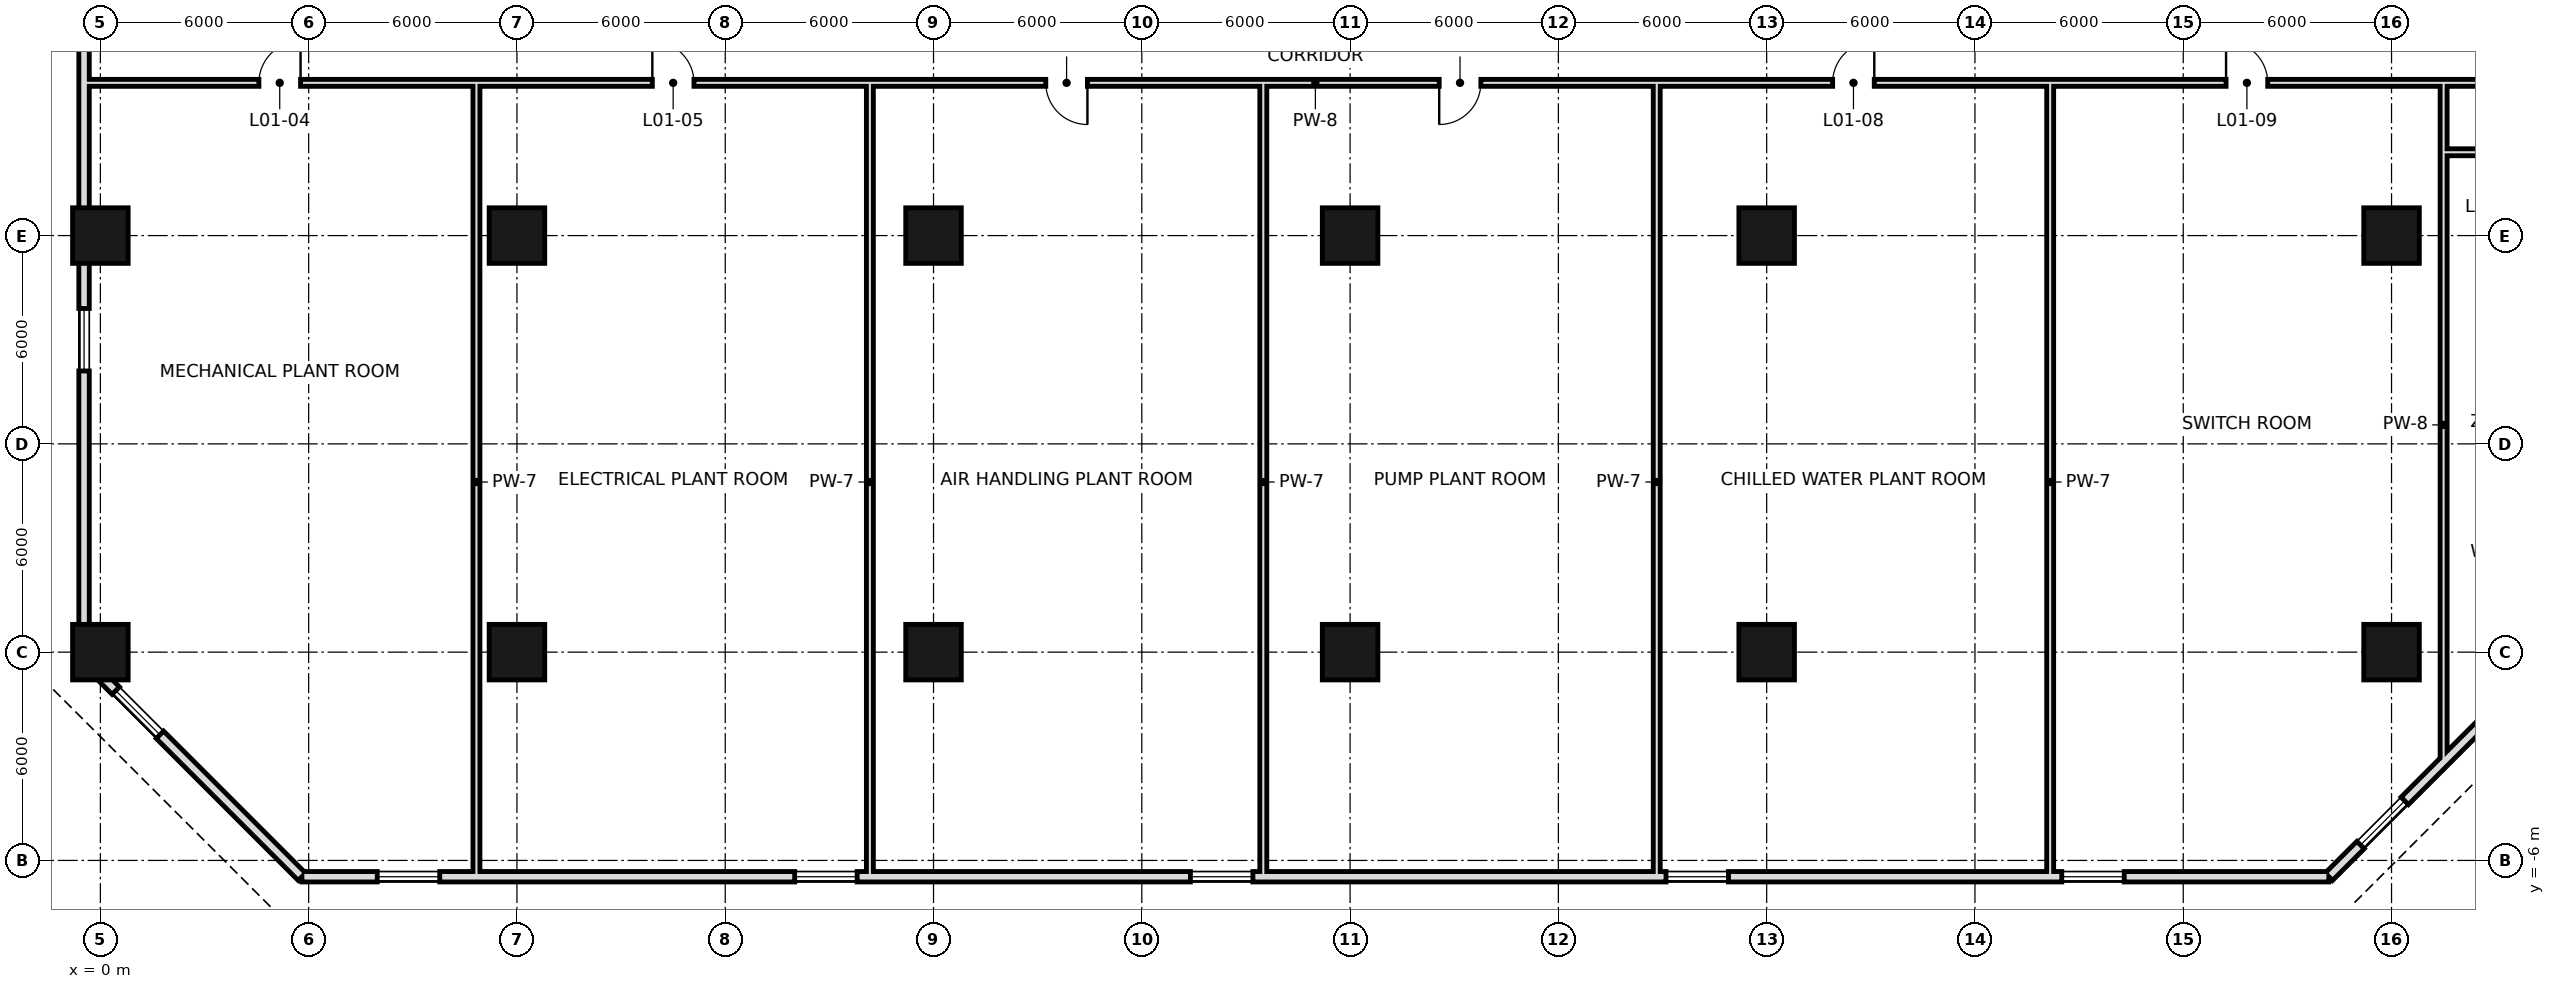
"""IFC4 building model, lengths in metres.
Left out: names, types, materials, properties, quantities, classifications, styles, units other than length and angle.
Written with IfcOpenShell. Run it as: python <this file> out.ifc"""

import sys

from ifc_helpers import new_model, si_unit, direction, frame, frame_2d, origin, origin_2d, place, context, subcontext, project, spatial, rectangle, hollow_rectangle, extrude, element, fill, save


model = new_model("IFC4")
c1 = context("Model", 3, precision=1e-05, world=origin(), true_north=direction((0.0, 1.0)))
c2 = subcontext(c1, "Body", "Model", "MODEL_VIEW")
j1 = project(units=[si_unit("LENGTHUNIT", "METRE"), si_unit("PLANEANGLEUNIT", "RADIAN")], contexts=[c1])
p1 = place(None, origin())
s1 = spatial("IfcSite", under=j1, at=p1, CompositionType="ELEMENT")
p2 = place(p1, origin())
s2 = spatial("IfcBuilding", under=s1, at=p2, CompositionType="ELEMENT")
p3 = place(p2, frame((0.0, 0.0, 15.0)))
s3 = spatial("IfcBuildingStorey", under=s2, at=p3, CompositionType="ELEMENT", Elevation=15.0)
for number, where, z_axis, x_axis in (
    (1, (0.0, 0.0, 0.0), (0.0, 0.0, 1.0), (1.0, 0.0, 0.0)),
    (2, (0.0, 12.0, 0.0), (0.0, 0.0, 1.0), (1.0, 0.0, 0.0)),
    (3, (12.0, 0.0, 0.0), (0.0, 0.0, 1.0), (1.0, 0.0, 0.0)),
    (4, (12.0, 12.0, 0.0), (0.0, 0.0, 1.0), (1.0, 0.0, 0.0)),
    (5, (24.0, 0.0, 0.0), (0.0, 0.0, 1.0), (1.0, 0.0, 0.0)),
    (6, (24.0, 12.0, 0.0), (0.0, 0.0, 1.0), (1.0, 0.0, 0.0)),
    (7, (36.0, 0.0, 0.0), (0.0, 0.0, 1.0), (1.0, 0.0, 0.0)),
    (8, (36.0, 12.0, 0.0), (0.0, 0.0, 1.0), (1.0, 0.0, 0.0)),
    (9, (48.0, 0.0, 0.0), (0.0, 0.0, 1.0), (1.0, 0.0, 0.0)),
    (10, (48.0, 12.0, 0.0), (0.0, 0.0, 1.0), (1.0, 0.0, 0.0)),
    (11, (66.0, 0.0, 0.0), (0.0, 0.0, 1.0), (1.0, 0.0, 0.0)),
    (12, (66.0, 12.0, 0.0), (0.0, 0.0, 1.0), (1.0, 0.0, 0.0)),
):
    element("IfcColumn", number, at=place(p3, frame(where, z_axis=z_axis, x_axis=x_axis)), inside=s3, PredefinedType="COLUMN", context=c2, shape_type="SweptSolid", body=[
        extrude(hollow_rectangle(XDim=1.6, YDim=1.6, WallThickness=0.07, at=origin_2d()), origin(), (0.0, 0.0, 1.0), 5.4),
    ])
p4 = place(p3, frame((5.805, -6.47, 0.0), z_axis=(0.0, 0.0, 1.0), x_axis=(1.0, 0.0, 0.0)))
e13 = element("IfcWall", 13, at=p4, inside=s3, PredefinedType="SOLIDWALL", context=c2, shape_type="SweptSolid", body=[
    extrude(rectangle(XDim=58.389, YDim=0.3, at=frame_2d((29.195, 0.0))), origin(), (0.0, 0.0, 1.0), 5.0),
])
p5 = place(p4, frame((2.17, 0.0, 0.9)))
e14 = element("IfcOpeningElement", 14, at=p5, cuts=e13, PredefinedType="OPENING", context=c2, shape_type="SweptSolid", body=[
    extrude(rectangle(XDim=1.8, YDim=1.5, at=frame_2d((0.9, 0.75))), frame((0.0, 0.16, 0.0), z_axis=(0.0, -1.0, 0.0), x_axis=(1.0, 0.0, 0.0)), (0.0, 0.0, 1.0), 0.32),
])
p6 = place(p4, frame((14.195, 0.0, 0.9)))
e15 = element("IfcOpeningElement", 15, at=p6, cuts=e13, PredefinedType="OPENING", context=c2, shape_type="SweptSolid", body=[
    extrude(rectangle(XDim=1.8, YDim=1.5, at=frame_2d((0.9, 0.75))), frame((0.0, 0.16, 0.0), z_axis=(0.0, -1.0, 0.0), x_axis=(1.0, 0.0, 0.0)), (0.0, 0.0, 1.0), 0.32),
])
p7 = place(p4, frame((25.595, 0.0, 0.9)))
e16 = element("IfcOpeningElement", 16, at=p7, cuts=e13, PredefinedType="OPENING", context=c2, shape_type="SweptSolid", body=[
    extrude(rectangle(XDim=1.8, YDim=1.5, at=frame_2d((0.9, 0.75))), frame((0.0, 0.16, 0.0), z_axis=(0.0, -1.0, 0.0), x_axis=(1.0, 0.0, 0.0)), (0.0, 0.0, 1.0), 0.32),
])
p8 = place(p4, frame((39.295, 0.0, 0.9)))
e17 = element("IfcOpeningElement", 17, at=p8, cuts=e13, PredefinedType="OPENING", context=c2, shape_type="SweptSolid", body=[
    extrude(rectangle(XDim=1.8, YDim=1.5, at=frame_2d((0.9, 0.75))), frame((0.0, 0.16, 0.0), z_axis=(0.0, -1.0, 0.0), x_axis=(1.0, 0.0, 0.0)), (0.0, 0.0, 1.0), 0.32),
])
p9 = place(p4, frame((50.695, 0.0, 0.9)))
e18 = element("IfcOpeningElement", 18, at=p9, cuts=e13, PredefinedType="OPENING", context=c2, shape_type="SweptSolid", body=[
    extrude(rectangle(XDim=1.8, YDim=1.5, at=frame_2d((0.9, 0.75))), frame((0.0, 0.16, 0.0), z_axis=(0.0, -1.0, 0.0), x_axis=(1.0, 0.0, 0.0)), (0.0, 0.0, 1.0), 0.32),
])
p10 = place(p3, frame((64.195, -6.47, 0.0), z_axis=(0.0, 0.0, 1.0), x_axis=(0.707106781187, 0.707106781187, 0.0)))
e19 = element("IfcWall", 19, at=p10, inside=s3, PredefinedType="SOLIDWALL", context=c2, shape_type="SweptSolid", body=[
    extrude(rectangle(XDim=8.875, YDim=0.3, at=frame_2d((4.438, 0.0))), origin(), (0.0, 0.0, 1.0), 5.0),
])
p11 = place(p10, frame((1.292, 0.0, 0.9)))
e20 = element("IfcOpeningElement", 20, at=p11, cuts=e19, PredefinedType="OPENING", context=c2, shape_type="SweptSolid", body=[
    extrude(rectangle(XDim=1.8, YDim=1.5, at=frame_2d((0.9, 0.75))), frame((0.0, 0.16, 0.0), z_axis=(0.0, -1.0, 0.0), x_axis=(1.0, 0.0, 0.0)), (0.0, 0.0, 1.0), 0.32),
])
p12 = place(p3, frame((-0.47, 46.195, 0.0), z_axis=(0.0, 0.0, 1.0), x_axis=(0.0, -1.0, 0.0)))
e21 = element("IfcWall", 21, at=p12, inside=s3, PredefinedType="SOLIDWALL", context=c2, shape_type="SweptSolid", body=[
    extrude(rectangle(XDim=46.389, YDim=0.3, at=frame_2d((23.195, 0.0))), origin(), (0.0, 0.0, 1.0), 5.0),
])
p13 = place(p12, frame((1.17, 0.0, 0.9)))
e22 = element("IfcOpeningElement", 22, at=p13, cuts=e21, PredefinedType="OPENING", context=c2, shape_type="SweptSolid", body=[
    extrude(rectangle(XDim=1.8, YDim=1.5, at=frame_2d((0.9, 0.75))), frame((0.0, 0.16, 0.0), z_axis=(0.0, -1.0, 0.0), x_axis=(1.0, 0.0, 0.0)), (0.0, 0.0, 1.0), 0.32),
])
p14 = place(p12, frame((12.295, 0.0, 0.9)))
e23 = element("IfcOpeningElement", 23, at=p14, cuts=e21, PredefinedType="OPENING", context=c2, shape_type="SweptSolid", body=[
    extrude(rectangle(XDim=1.8, YDim=1.5, at=frame_2d((0.9, 0.75))), frame((0.0, 0.16, 0.0), z_axis=(0.0, -1.0, 0.0), x_axis=(1.0, 0.0, 0.0)), (0.0, 0.0, 1.0), 0.32),
])
p15 = place(p12, frame((24.295, 0.0, 0.9)))
e24 = element("IfcOpeningElement", 24, at=p15, cuts=e21, PredefinedType="OPENING", context=c2, shape_type="SweptSolid", body=[
    extrude(rectangle(XDim=1.8, YDim=1.5, at=frame_2d((0.9, 0.75))), frame((0.0, 0.16, 0.0), z_axis=(0.0, -1.0, 0.0), x_axis=(1.0, 0.0, 0.0)), (0.0, 0.0, 1.0), 0.32),
])
p16 = place(p12, frame((36.295, 0.0, 0.9)))
e25 = element("IfcOpeningElement", 25, at=p16, cuts=e21, PredefinedType="OPENING", context=c2, shape_type="SweptSolid", body=[
    extrude(rectangle(XDim=1.8, YDim=1.5, at=frame_2d((0.9, 0.75))), frame((0.0, 0.16, 0.0), z_axis=(0.0, -1.0, 0.0), x_axis=(1.0, 0.0, 0.0)), (0.0, 0.0, 1.0), 0.32),
])
p17 = place(p3, frame((-0.47, -0.195, 0.0), z_axis=(0.0, 0.0, 1.0), x_axis=(0.707106781187, -0.707106781187, 0.0)))
e26 = element("IfcWall", 26, at=p17, inside=s3, PredefinedType="SOLIDWALL", context=c2, shape_type="SweptSolid", body=[
    extrude(rectangle(XDim=8.875, YDim=0.3, at=frame_2d((4.438, 0.0))), origin(), (0.0, 0.0, 1.0), 5.0),
])
p18 = place(p17, frame((1.292, 0.0, 0.9)))
e27 = element("IfcOpeningElement", 27, at=p18, cuts=e26, PredefinedType="OPENING", context=c2, shape_type="SweptSolid", body=[
    extrude(rectangle(XDim=1.8, YDim=1.5, at=frame_2d((0.9, 0.75))), frame((0.0, 0.16, 0.0), z_axis=(0.0, -1.0, 0.0), x_axis=(1.0, 0.0, 0.0)), (0.0, 0.0, 1.0), 0.32),
])
for number, where, z_axis, x_axis in (
    (28, (10.833, -6.5, 0.0), (0.0, 0.0, 1.0), (0.0, 1.0, 0.0)),
    (29, (22.167, -6.5, 0.0), (0.0, 0.0, 1.0), (0.0, 1.0, 0.0)),
    (30, (33.5, -6.5, 0.0), (0.0, 0.0, 1.0), (0.0, 1.0, 0.0)),
    (31, (44.833, -6.5, 0.0), (0.0, 0.0, 1.0), (0.0, 1.0, 0.0)),
    (32, (56.167, -6.5, 0.0), (0.0, 0.0, 1.0), (0.0, 1.0, 0.0)),
):
    element("IfcWall", number, at=place(p3, frame(where, z_axis=z_axis, x_axis=x_axis)), inside=s3, PredefinedType="SOLIDWALL", context=c2, shape_type="SweptSolid", body=[
        extrude(rectangle(XDim=22.8, YDim=0.2, at=frame_2d((11.4, 0.0))), origin(), (0.0, 0.0, 1.0), 3.2),
    ])
p19 = place(p3, frame((67.5, -3.207, 0.0), z_axis=(0.0, 0.0, 1.0), x_axis=(0.0, 1.0, 0.0)))
e33 = element("IfcWall", 33, at=p19, inside=s3, PredefinedType="SOLIDWALL", context=c2, shape_type="SweptSolid", body=[
    extrude(rectangle(XDim=19.507, YDim=0.2, at=frame_2d((9.753, 0.0))), origin(), (0.0, 0.0, 1.0), 3.2),
])
p20 = place(p3, frame((67.6, 14.4, 0.0), z_axis=(0.0, 0.0, 1.0), x_axis=(1.0, 0.0, 0.0)))
e34 = element("IfcWall", 34, at=p20, inside=s3, PredefinedType="SOLIDWALL", context=c2, shape_type="SweptSolid", body=[
    extrude(rectangle(XDim=2.9, YDim=0.2, at=frame_2d((1.45, 0.0))), origin(), (0.0, 0.0, 1.0), 5.0),
])
p21 = place(p20, frame((0.9, 0.0, 0.0)))
e35 = element("IfcOpeningElement", 35, at=p21, cuts=e34, PredefinedType="OPENING", context=c2, shape_type="SweptSolid", body=[
    extrude(rectangle(XDim=1.0, YDim=2.4, at=frame_2d((0.5, 1.2))), frame((0.0, 0.11, 0.0), z_axis=(0.0, -1.0, 0.0), x_axis=(1.0, 0.0, 0.0)), (0.0, 0.0, 1.0), 0.22),
])
p22 = place(p3, frame((-0.5, 16.4, 0.0), z_axis=(0.0, 0.0, 1.0), x_axis=(1.0, 0.0, 0.0)))
e36 = element("IfcWall", 36, at=p22, inside=s3, PredefinedType="SOLIDWALL", context=c2, shape_type="SweptSolid", body=[
    extrude(rectangle(XDim=71.0, YDim=0.2, at=frame_2d((35.5, 0.0))), origin(), (0.0, 0.0, 1.0), 3.2),
])
p23 = place(p22, frame((5.067, 0.0, 0.0)))
e37 = element("IfcOpeningElement", 37, at=p23, cuts=e36, PredefinedType="OPENING", context=c2, shape_type="SweptSolid", body=[
    extrude(rectangle(XDim=1.2, YDim=2.4, at=frame_2d((0.6, 1.2))), frame((0.0, 0.11, 0.0), z_axis=(0.0, -1.0, 0.0), x_axis=(1.0, 0.0, 0.0)), (0.0, 0.0, 1.0), 0.22),
])
p24 = place(p22, frame((16.4, 0.0, 0.0)))
e38 = element("IfcOpeningElement", 38, at=p24, cuts=e36, PredefinedType="OPENING", context=c2, shape_type="SweptSolid", body=[
    extrude(rectangle(XDim=1.2, YDim=2.4, at=frame_2d((0.6, 1.2))), frame((0.0, 0.11, 0.0), z_axis=(0.0, -1.0, 0.0), x_axis=(1.0, 0.0, 0.0)), (0.0, 0.0, 1.0), 0.22),
])
p25 = place(p22, frame((27.733, 0.0, 0.0)))
e39 = element("IfcOpeningElement", 39, at=p25, cuts=e36, PredefinedType="OPENING", context=c2, shape_type="SweptSolid", body=[
    extrude(rectangle(XDim=1.2, YDim=2.4, at=frame_2d((0.6, 1.2))), frame((0.0, 0.11, 0.0), z_axis=(0.0, -1.0, 0.0), x_axis=(1.0, 0.0, 0.0)), (0.0, 0.0, 1.0), 0.22),
])
p26 = place(p22, frame((39.067, 0.0, 0.0)))
e40 = element("IfcOpeningElement", 40, at=p26, cuts=e36, PredefinedType="OPENING", context=c2, shape_type="SweptSolid", body=[
    extrude(rectangle(XDim=1.2, YDim=2.4, at=frame_2d((0.6, 1.2))), frame((0.0, 0.11, 0.0), z_axis=(0.0, -1.0, 0.0), x_axis=(1.0, 0.0, 0.0)), (0.0, 0.0, 1.0), 0.22),
])
p27 = place(p22, frame((50.4, 0.0, 0.0)))
e41 = element("IfcOpeningElement", 41, at=p27, cuts=e36, PredefinedType="OPENING", context=c2, shape_type="SweptSolid", body=[
    extrude(rectangle(XDim=1.2, YDim=2.4, at=frame_2d((0.6, 1.2))), frame((0.0, 0.11, 0.0), z_axis=(0.0, -1.0, 0.0), x_axis=(1.0, 0.0, 0.0)), (0.0, 0.0, 1.0), 0.22),
])
p28 = place(p22, frame((61.733, 0.0, 0.0)))
e42 = element("IfcOpeningElement", 42, at=p28, cuts=e36, PredefinedType="OPENING", context=c2, shape_type="SweptSolid", body=[
    extrude(rectangle(XDim=1.2, YDim=2.4, at=frame_2d((0.6, 1.2))), frame((0.0, 0.11, 0.0), z_axis=(0.0, -1.0, 0.0), x_axis=(1.0, 0.0, 0.0)), (0.0, 0.0, 1.0), 0.22),
])
p29 = place(p22, frame((69.0, 0.0, 0.0)))
e43 = element("IfcOpeningElement", 43, at=p29, cuts=e36, PredefinedType="OPENING", context=c2, shape_type="SweptSolid", body=[
    extrude(rectangle(XDim=1.0, YDim=2.4, at=frame_2d((0.5, 1.2))), frame((0.0, 0.11, 0.0), z_axis=(0.0, -1.0, 0.0), x_axis=(1.0, 0.0, 0.0)), (0.0, 0.0, 1.0), 0.22),
])
p30 = place(p5, origin())
e44 = element("IfcWindow", 44, at=p30, inside=s3, PartitioningType="SINGLE_PANEL", PredefinedType="WINDOW", context=c2, shape_type="SweptSolid", body=[
    extrude(rectangle(XDim=1.8, YDim=1.5, at=frame_2d((0.9, 0.75))), frame((0.0, 0.03, 0.0), z_axis=(0.0, -1.0, 0.0), x_axis=(1.0, 0.0, 0.0)), (0.0, 0.0, 1.0), 0.06),
])
fill(e14, e44)
p31 = place(p6, origin())
e45 = element("IfcWindow", 45, at=p31, inside=s3, PartitioningType="SINGLE_PANEL", PredefinedType="WINDOW", context=c2, shape_type="SweptSolid", body=[
    extrude(rectangle(XDim=1.8, YDim=1.5, at=frame_2d((0.9, 0.75))), frame((0.0, 0.03, 0.0), z_axis=(0.0, -1.0, 0.0), x_axis=(1.0, 0.0, 0.0)), (0.0, 0.0, 1.0), 0.06),
])
fill(e15, e45)
p32 = place(p7, origin())
e46 = element("IfcWindow", 46, at=p32, inside=s3, PartitioningType="SINGLE_PANEL", PredefinedType="WINDOW", context=c2, shape_type="SweptSolid", body=[
    extrude(rectangle(XDim=1.8, YDim=1.5, at=frame_2d((0.9, 0.75))), frame((0.0, 0.03, 0.0), z_axis=(0.0, -1.0, 0.0), x_axis=(1.0, 0.0, 0.0)), (0.0, 0.0, 1.0), 0.06),
])
fill(e16, e46)
p33 = place(p8, origin())
e47 = element("IfcWindow", 47, at=p33, inside=s3, PartitioningType="SINGLE_PANEL", PredefinedType="WINDOW", context=c2, shape_type="SweptSolid", body=[
    extrude(rectangle(XDim=1.8, YDim=1.5, at=frame_2d((0.9, 0.75))), frame((0.0, 0.03, 0.0), z_axis=(0.0, -1.0, 0.0), x_axis=(1.0, 0.0, 0.0)), (0.0, 0.0, 1.0), 0.06),
])
fill(e17, e47)
p34 = place(p9, origin())
e48 = element("IfcWindow", 48, at=p34, inside=s3, PartitioningType="SINGLE_PANEL", PredefinedType="WINDOW", context=c2, shape_type="SweptSolid", body=[
    extrude(rectangle(XDim=1.8, YDim=1.5, at=frame_2d((0.9, 0.75))), frame((0.0, 0.03, 0.0), z_axis=(0.0, -1.0, 0.0), x_axis=(1.0, 0.0, 0.0)), (0.0, 0.0, 1.0), 0.06),
])
fill(e18, e48)
p35 = place(p11, origin())
e49 = element("IfcWindow", 49, at=p35, inside=s3, PartitioningType="SINGLE_PANEL", PredefinedType="WINDOW", context=c2, shape_type="SweptSolid", body=[
    extrude(rectangle(XDim=1.8, YDim=1.5, at=frame_2d((0.9, 0.75))), frame((0.0, 0.03, 0.0), z_axis=(0.0, -1.0, 0.0), x_axis=(1.0, 0.0, 0.0)), (0.0, 0.0, 1.0), 0.06),
])
fill(e20, e49)
p36 = place(p16, origin())
e50 = element("IfcWindow", 50, at=p36, inside=s3, PartitioningType="SINGLE_PANEL", PredefinedType="WINDOW", context=c2, shape_type="SweptSolid", body=[
    extrude(rectangle(XDim=1.8, YDim=1.5, at=frame_2d((0.9, 0.75))), frame((0.0, 0.03, 0.0), z_axis=(0.0, -1.0, 0.0), x_axis=(1.0, 0.0, 0.0)), (0.0, 0.0, 1.0), 0.06),
])
fill(e25, e50)
p37 = place(p18, origin())
e51 = element("IfcWindow", 51, at=p37, inside=s3, PartitioningType="SINGLE_PANEL", PredefinedType="WINDOW", context=c2, shape_type="SweptSolid", body=[
    extrude(rectangle(XDim=1.8, YDim=1.5, at=frame_2d((0.9, 0.75))), frame((0.0, 0.03, 0.0), z_axis=(0.0, -1.0, 0.0), x_axis=(1.0, 0.0, 0.0)), (0.0, 0.0, 1.0), 0.06),
])
fill(e27, e51)
p38 = place(p23, frame((1.2, 0.0, 0.0), z_axis=(0.0, 0.0, 1.0), x_axis=(-1.0, 0.0, 0.0)))
e52 = element("IfcDoor", 52, at=p38, inside=s3, OperationType="SINGLE_SWING_LEFT", PredefinedType="DOOR", context=c2, shape_type="SweptSolid", body=[
    extrude(rectangle(XDim=1.2, YDim=2.4, at=frame_2d((0.6, 1.2))), frame((0.0, 0.025, 0.0), z_axis=(0.0, -1.0, 0.0), x_axis=(1.0, 0.0, 0.0)), (0.0, 0.0, 1.0), 0.05),
])
fill(e37, e52)
p39 = place(p24, origin())
e53 = element("IfcDoor", 53, at=p39, inside=s3, OperationType="SINGLE_SWING_LEFT", PredefinedType="DOOR", context=c2, shape_type="SweptSolid", body=[
    extrude(rectangle(XDim=1.2, YDim=2.4, at=frame_2d((0.6, 1.2))), frame((0.0, 0.025, 0.0), z_axis=(0.0, -1.0, 0.0), x_axis=(1.0, 0.0, 0.0)), (0.0, 0.0, 1.0), 0.05),
])
fill(e38, e53)
p40 = place(p25, origin())
e54 = element("IfcDoor", 54, at=p40, inside=s3, OperationType="SINGLE_SWING_RIGHT", PredefinedType="DOOR", context=c2, shape_type="SweptSolid", body=[
    extrude(rectangle(XDim=1.2, YDim=2.4, at=frame_2d((0.6, 1.2))), frame((0.0, 0.025, 0.0), z_axis=(0.0, -1.0, 0.0), x_axis=(1.0, 0.0, 0.0)), (0.0, 0.0, 1.0), 0.05),
])
fill(e39, e54)
p41 = place(p26, frame((1.2, 0.0, 0.0), z_axis=(0.0, 0.0, 1.0), x_axis=(-1.0, 0.0, 0.0)))
e55 = element("IfcDoor", 55, at=p41, inside=s3, OperationType="SINGLE_SWING_RIGHT", PredefinedType="DOOR", context=c2, shape_type="SweptSolid", body=[
    extrude(rectangle(XDim=1.2, YDim=2.4, at=frame_2d((0.6, 1.2))), frame((0.0, 0.025, 0.0), z_axis=(0.0, -1.0, 0.0), x_axis=(1.0, 0.0, 0.0)), (0.0, 0.0, 1.0), 0.05),
])
fill(e40, e55)
p42 = place(p27, frame((1.2, 0.0, 0.0), z_axis=(0.0, 0.0, 1.0), x_axis=(-1.0, 0.0, 0.0)))
e56 = element("IfcDoor", 56, at=p42, inside=s3, OperationType="SINGLE_SWING_LEFT", PredefinedType="DOOR", context=c2, shape_type="SweptSolid", body=[
    extrude(rectangle(XDim=1.2, YDim=2.4, at=frame_2d((0.6, 1.2))), frame((0.0, 0.025, 0.0), z_axis=(0.0, -1.0, 0.0), x_axis=(1.0, 0.0, 0.0)), (0.0, 0.0, 1.0), 0.05),
])
fill(e41, e56)
p43 = place(p28, origin())
e57 = element("IfcDoor", 57, at=p43, inside=s3, OperationType="SINGLE_SWING_LEFT", PredefinedType="DOOR", context=c2, shape_type="SweptSolid", body=[
    extrude(rectangle(XDim=1.2, YDim=2.4, at=frame_2d((0.6, 1.2))), frame((0.0, 0.025, 0.0), z_axis=(0.0, -1.0, 0.0), x_axis=(1.0, 0.0, 0.0)), (0.0, 0.0, 1.0), 0.05),
])
fill(e42, e57)
save(model, sys.argv[1])
